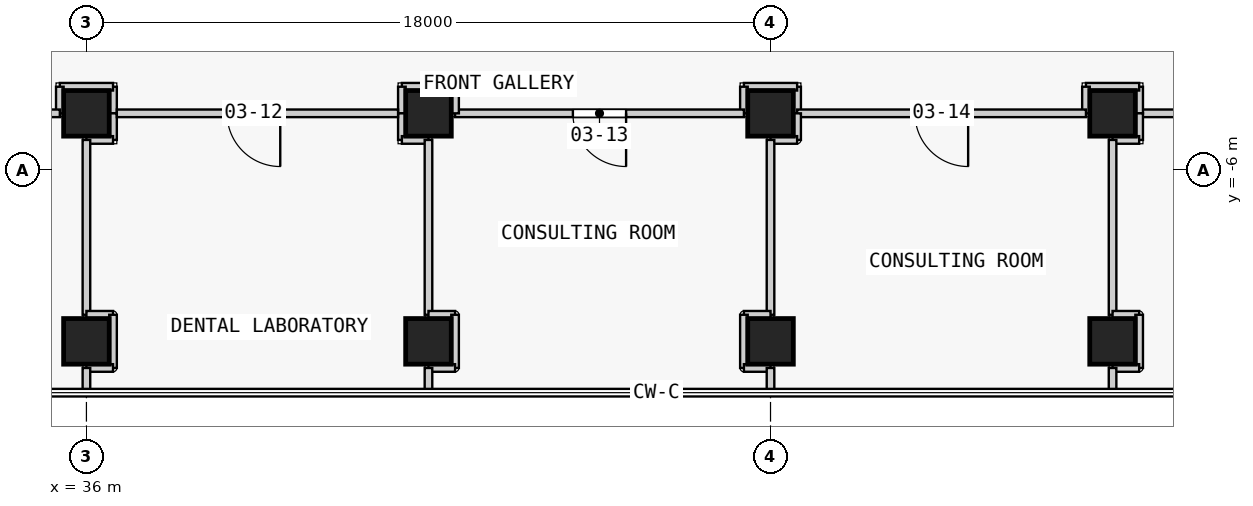
"""IFC4 building model, lengths in metres.
Left out: names, types, materials, properties, quantities, classifications, styles, units other than length and angle.
Written with IfcOpenShell. Run it as: python <this file> out.ifc"""

import sys

from ifc_helpers import new_model, si_unit, direction, frame, frame_2d, origin, origin_2d, place, context, subcontext, project, spatial, rectangle, extrude, element, fill, save


model = new_model("IFC4")
c1 = context("Model", 3, precision=1e-05, world=origin(), true_north=direction((0.0, 1.0)))
c2 = subcontext(c1, "Body", "Model", "MODEL_VIEW")
j1 = project(units=[si_unit("LENGTHUNIT", "METRE"), si_unit("PLANEANGLEUNIT", "RADIAN")], contexts=[c1])
p1 = place(None, origin())
s1 = spatial("IfcSite", under=j1, at=p1, CompositionType="ELEMENT")
p2 = place(p1, origin())
s2 = spatial("IfcBuilding", under=s1, at=p2, CompositionType="ELEMENT")
p3 = place(p2, frame((0.0, 0.0, 17.3)))
s3 = spatial("IfcBuildingStorey", under=s2, at=p3, CompositionType="ELEMENT", Elevation=17.3)
for number, where, z_axis, x_axis in (
    (1, (36.0, -10.5, 0.0), (0.0, 0.0, 1.0), (1.0, 0.0, 0.0)),
    (2, (36.0, -4.5, 0.0), (0.0, 0.0, 1.0), (1.0, 0.0, 0.0)),
    (3, (45.0, -10.5, 0.0), (0.0, 0.0, 1.0), (1.0, 0.0, 0.0)),
    (4, (45.0, -4.5, 0.0), (0.0, 0.0, 1.0), (1.0, 0.0, 0.0)),
    (5, (54.0, -10.5, 0.0), (0.0, 0.0, 1.0), (1.0, 0.0, 0.0)),
    (6, (54.0, -4.5, 0.0), (0.0, 0.0, 1.0), (1.0, 0.0, 0.0)),
    (7, (63.0, -10.5, 0.0), (0.0, 0.0, 1.0), (1.0, 0.0, 0.0)),
    (8, (63.0, -4.5, 0.0), (0.0, 0.0, 1.0), (1.0, 0.0, 0.0)),
):
    element("IfcColumn", number, at=place(p3, frame(where, z_axis=z_axis, x_axis=x_axis)), inside=s3, PredefinedType="COLUMN", context=c2, shape_type="SweptSolid", body=[
        extrude(rectangle(XDim=1.2, YDim=1.2, at=origin_2d()), origin(), (0.0, 0.0, 1.0), 4.5),
    ])
p4 = place(p3, frame((54.7, -4.5, 0.0), z_axis=(0.0, 0.0, 1.0), x_axis=(0.0, 1.0, 0.0)))
e9 = element("IfcWall", 9, at=p4, inside=s3, PredefinedType="PARTITIONING", context=c2, shape_type="SweptSolid", body=[
    extrude(rectangle(XDim=0.7, YDim=0.2, at=frame_2d((0.35, 0.0))), origin(), (0.0, 0.0, 1.0), 4.15),
])
p5 = place(p3, frame((54.7, -3.8, 0.0), z_axis=(0.0, 0.0, 1.0), x_axis=(-1.0, 0.0, 0.0)))
e10 = element("IfcWall", 10, at=p5, inside=s3, PredefinedType="PARTITIONING", context=c2, shape_type="SweptSolid", body=[
    extrude(rectangle(XDim=1.4, YDim=0.2, at=frame_2d((0.7, 0.0))), origin(), (0.0, 0.0, 1.0), 4.15),
])
p6 = place(p3, frame((53.3, -3.8, 0.0), z_axis=(0.0, 0.0, 1.0), x_axis=(0.0, -1.0, 0.0)))
e11 = element("IfcWall", 11, at=p6, inside=s3, PredefinedType="PARTITIONING", context=c2, shape_type="SweptSolid", body=[
    extrude(rectangle(XDim=0.7, YDim=0.2, at=frame_2d((0.35, 0.0))), origin(), (0.0, 0.0, 1.0), 4.15),
])
p7 = place(p3, frame((53.3, -4.5, 0.0), z_axis=(0.0, 0.0, 1.0), x_axis=(-1.0, 0.0, 0.0)))
e12 = element("IfcWall", 12, at=p7, inside=s3, PredefinedType="PARTITIONING", context=c2, shape_type="SweptSolid", body=[
    extrude(rectangle(XDim=7.6, YDim=0.2, at=frame_2d((3.8, 0.0))), origin(), (0.0, 0.0, 1.0), 4.15),
])
p8 = place(p7, frame((3.1, 0.0, 0.0)))
e13 = element("IfcOpeningElement", 13, at=p8, cuts=e12, PredefinedType="OPENING", context=c2, shape_type="SweptSolid", body=[
    extrude(rectangle(XDim=1.4, YDim=2.1, at=frame_2d((0.7, 1.05))), frame((0.0, 0.11, 0.0), z_axis=(0.0, -1.0, 0.0), x_axis=(1.0, 0.0, 0.0)), (0.0, 0.0, 1.0), 0.22),
])
p9 = place(p3, frame((45.7, -4.5, 0.0), z_axis=(0.0, 0.0, 1.0), x_axis=(0.0, 1.0, 0.0)))
e14 = element("IfcWall", 14, at=p9, inside=s3, PredefinedType="PARTITIONING", context=c2, shape_type="SweptSolid", body=[
    extrude(rectangle(XDim=0.7, YDim=0.2, at=frame_2d((0.35, 0.0))), origin(), (0.0, 0.0, 1.0), 4.15),
])
p10 = place(p3, frame((45.7, -3.8, 0.0), z_axis=(0.0, 0.0, 1.0), x_axis=(-1.0, 0.0, 0.0)))
e15 = element("IfcWall", 15, at=p10, inside=s3, PredefinedType="PARTITIONING", context=c2, shape_type="SweptSolid", body=[
    extrude(rectangle(XDim=1.4, YDim=0.2, at=frame_2d((0.7, 0.0))), origin(), (0.0, 0.0, 1.0), 4.15),
])
for number, where, z_axis, x_axis in (
    (16, (44.3, -3.8, 0.0), (0.0, 0.0, 1.0), (0.0, -1.0, 0.0)),
    (17, (36.7, -4.5, 0.0), (0.0, 0.0, 1.0), (0.0, 1.0, 0.0)),
):
    element("IfcWall", number, at=place(p3, frame(where, z_axis=z_axis, x_axis=x_axis)), inside=s3, PredefinedType="PARTITIONING", context=c2, shape_type="SweptSolid", body=[
        extrude(rectangle(XDim=0.7, YDim=0.2, at=frame_2d((0.35, 0.0))), origin(), (0.0, 0.0, 1.0), 4.15),
    ])
p11 = place(p3, frame((36.7, -3.8, 0.0), z_axis=(0.0, 0.0, 1.0), x_axis=(-1.0, 0.0, 0.0)))
e18 = element("IfcWall", 18, at=p11, inside=s3, PredefinedType="PARTITIONING", context=c2, shape_type="SweptSolid", body=[
    extrude(rectangle(XDim=1.4, YDim=0.2, at=frame_2d((0.7, 0.0))), origin(), (0.0, 0.0, 1.0), 4.15),
])
p12 = place(p3, frame((35.3, -3.8, 0.0), z_axis=(0.0, 0.0, 1.0), x_axis=(0.0, -1.0, 0.0)))
e19 = element("IfcWall", 19, at=p12, inside=s3, PredefinedType="PARTITIONING", context=c2, shape_type="SweptSolid", body=[
    extrude(rectangle(XDim=0.7, YDim=0.2, at=frame_2d((0.35, 0.0))), origin(), (0.0, 0.0, 1.0), 4.15),
])
p13 = place(p3, frame((35.3, -4.5, 0.0), z_axis=(0.0, 0.0, 1.0), x_axis=(-1.0, 0.0, 0.0)))
e20 = element("IfcWall", 20, at=p13, inside=s3, PredefinedType="PARTITIONING", context=c2, shape_type="SweptSolid", body=[
    extrude(rectangle(XDim=7.6, YDim=0.2, at=frame_2d((3.8, 0.0))), origin(), (0.0, 0.0, 1.0), 4.15),
])
p14 = place(p13, frame((3.1, 0.0, 0.0)))
e21 = element("IfcOpeningElement", 21, at=p14, cuts=e20, PredefinedType="OPENING", context=c2, shape_type="SweptSolid", body=[
    extrude(rectangle(XDim=1.4, YDim=2.1, at=frame_2d((0.7, 1.05))), frame((0.0, 0.11, 0.0), z_axis=(0.0, -1.0, 0.0), x_axis=(1.0, 0.0, 0.0)), (0.0, 0.0, 1.0), 0.22),
])
p15 = place(p3, frame((74.0, -4.5, 0.0), z_axis=(0.0, 0.0, 1.0), x_axis=(-1.0, 0.0, 0.0)))
e22 = element("IfcWall", 22, at=p15, inside=s3, PredefinedType="PARTITIONING", context=c2, shape_type="SweptSolid", body=[
    extrude(rectangle(XDim=10.3, YDim=0.2, at=frame_2d((5.15, 0.0))), origin(), (0.0, 0.0, 1.0), 4.15),
])
p16 = place(p15, frame((4.35, 0.0, 0.0)))
e23 = element("IfcOpeningElement", 23, at=p16, cuts=e22, PredefinedType="OPENING", context=c2, shape_type="SweptSolid", body=[
    extrude(rectangle(XDim=1.4, YDim=2.1, at=frame_2d((0.7, 1.05))), frame((0.0, 0.11, 0.0), z_axis=(0.0, -1.0, 0.0), x_axis=(1.0, 0.0, 0.0)), (0.0, 0.0, 1.0), 0.22),
])
p17 = place(p3, frame((63.7, -4.5, 0.0), z_axis=(0.0, 0.0, 1.0), x_axis=(0.0, 1.0, 0.0)))
e24 = element("IfcWall", 24, at=p17, inside=s3, PredefinedType="PARTITIONING", context=c2, shape_type="SweptSolid", body=[
    extrude(rectangle(XDim=0.7, YDim=0.2, at=frame_2d((0.35, 0.0))), origin(), (0.0, 0.0, 1.0), 4.15),
])
p18 = place(p3, frame((63.7, -3.8, 0.0), z_axis=(0.0, 0.0, 1.0), x_axis=(-1.0, 0.0, 0.0)))
e25 = element("IfcWall", 25, at=p18, inside=s3, PredefinedType="PARTITIONING", context=c2, shape_type="SweptSolid", body=[
    extrude(rectangle(XDim=1.4, YDim=0.2, at=frame_2d((0.7, 0.0))), origin(), (0.0, 0.0, 1.0), 4.15),
])
p19 = place(p3, frame((62.3, -3.8, 0.0), z_axis=(0.0, 0.0, 1.0), x_axis=(0.0, -1.0, 0.0)))
e26 = element("IfcWall", 26, at=p19, inside=s3, PredefinedType="PARTITIONING", context=c2, shape_type="SweptSolid", body=[
    extrude(rectangle(XDim=0.7, YDim=0.2, at=frame_2d((0.35, 0.0))), origin(), (0.0, 0.0, 1.0), 4.15),
])
p20 = place(p3, frame((62.3, -4.5, 0.0), z_axis=(0.0, 0.0, 1.0), x_axis=(-1.0, 0.0, 0.0)))
e27 = element("IfcWall", 27, at=p20, inside=s3, PredefinedType="PARTITIONING", context=c2, shape_type="SweptSolid", body=[
    extrude(rectangle(XDim=7.6, YDim=0.2, at=frame_2d((3.8, 0.0))), origin(), (0.0, 0.0, 1.0), 4.15),
])
p21 = place(p20, frame((3.1, 0.0, 0.0)))
e28 = element("IfcOpeningElement", 28, at=p21, cuts=e27, PredefinedType="OPENING", context=c2, shape_type="SweptSolid", body=[
    extrude(rectangle(XDim=1.4, YDim=2.1, at=frame_2d((0.7, 1.05))), frame((0.0, 0.11, 0.0), z_axis=(0.0, -1.0, 0.0), x_axis=(1.0, 0.0, 0.0)), (0.0, 0.0, 1.0), 0.22),
])
for number, where, z_axis, x_axis in (
    (29, (44.3, -4.5, 0.0), (0.0, 0.0, 1.0), (0.0, -1.0, 0.0)),
    (30, (44.3, -5.2, 0.0), (0.0, 0.0, 1.0), (1.0, 0.0, 0.0)),
):
    element("IfcWall", number, at=place(p3, frame(where, z_axis=z_axis, x_axis=x_axis)), inside=s3, PredefinedType="PARTITIONING", context=c2, shape_type="SweptSolid", body=[
        extrude(rectangle(XDim=0.7, YDim=0.2, at=frame_2d((0.35, 0.0))), origin(), (0.0, 0.0, 1.0), 4.15),
    ])
p22 = place(p3, frame((45.0, -5.2, 0.0), z_axis=(0.0, 0.0, 1.0), x_axis=(0.0, -1.0, 0.0)))
e31 = element("IfcWall", 31, at=p22, inside=s3, PredefinedType="PARTITIONING", context=c2, shape_type="SweptSolid", body=[
    extrude(rectangle(XDim=4.6, YDim=0.2, at=frame_2d((2.3, 0.0))), origin(), (0.0, 0.0, 1.0), 4.15),
])
p23 = place(p3, frame((45.0, -9.8, 0.0), z_axis=(0.0, 0.0, 1.0), x_axis=(1.0, 0.0, 0.0)))
e32 = element("IfcWall", 32, at=p23, inside=s3, PredefinedType="PARTITIONING", context=c2, shape_type="SweptSolid", body=[
    extrude(rectangle(XDim=0.7, YDim=0.2, at=frame_2d((0.35, 0.0))), origin(), (0.0, 0.0, 1.0), 4.15),
])
p24 = place(p3, frame((45.7, -9.8, 0.0), z_axis=(0.0, 0.0, 1.0), x_axis=(0.0, -1.0, 0.0)))
e33 = element("IfcWall", 33, at=p24, inside=s3, PredefinedType="PARTITIONING", context=c2, shape_type="SweptSolid", body=[
    extrude(rectangle(XDim=1.4, YDim=0.2, at=frame_2d((0.7, 0.0))), origin(), (0.0, 0.0, 1.0), 4.15),
])
p25 = place(p3, frame((45.7, -11.2, 0.0), z_axis=(0.0, 0.0, 1.0), x_axis=(-1.0, 0.0, 0.0)))
e34 = element("IfcWall", 34, at=p25, inside=s3, PredefinedType="PARTITIONING", context=c2, shape_type="SweptSolid", body=[
    extrude(rectangle(XDim=0.7, YDim=0.2, at=frame_2d((0.35, 0.0))), origin(), (0.0, 0.0, 1.0), 4.15),
])
p26 = place(p3, frame((45.0, -11.2, 0.0), z_axis=(0.0, 0.0, 1.0), x_axis=(0.0, -1.0, 0.0)))
e35 = element("IfcWall", 35, at=p26, inside=s3, PredefinedType="PARTITIONING", context=c2, shape_type="SweptSolid", body=[
    extrude(rectangle(XDim=0.65, YDim=0.2, at=frame_2d((0.325, 0.0))), origin(), (0.0, 0.0, 1.0), 4.15),
])
for number, where, z_axis, x_axis in (
    (36, (54.7, -4.5, 0.0), (0.0, 0.0, 1.0), (0.0, -1.0, 0.0)),
    (37, (54.7, -5.2, 0.0), (0.0, 0.0, 1.0), (-1.0, 0.0, 0.0)),
):
    element("IfcWall", number, at=place(p3, frame(where, z_axis=z_axis, x_axis=x_axis)), inside=s3, PredefinedType="PARTITIONING", context=c2, shape_type="SweptSolid", body=[
        extrude(rectangle(XDim=0.7, YDim=0.2, at=frame_2d((0.35, 0.0))), origin(), (0.0, 0.0, 1.0), 4.15),
    ])
p27 = place(p3, frame((54.0, -5.2, 0.0), z_axis=(0.0, 0.0, 1.0), x_axis=(0.0, -1.0, 0.0)))
e38 = element("IfcWall", 38, at=p27, inside=s3, PredefinedType="PARTITIONING", context=c2, shape_type="SweptSolid", body=[
    extrude(rectangle(XDim=4.6, YDim=0.2, at=frame_2d((2.3, 0.0))), origin(), (0.0, 0.0, 1.0), 4.15),
])
p28 = place(p3, frame((54.0, -9.8, 0.0), z_axis=(0.0, 0.0, 1.0), x_axis=(-1.0, 0.0, 0.0)))
e39 = element("IfcWall", 39, at=p28, inside=s3, PredefinedType="PARTITIONING", context=c2, shape_type="SweptSolid", body=[
    extrude(rectangle(XDim=0.7, YDim=0.2, at=frame_2d((0.35, 0.0))), origin(), (0.0, 0.0, 1.0), 4.15),
])
p29 = place(p3, frame((53.3, -9.8, 0.0), z_axis=(0.0, 0.0, 1.0), x_axis=(0.0, -1.0, 0.0)))
e40 = element("IfcWall", 40, at=p29, inside=s3, PredefinedType="PARTITIONING", context=c2, shape_type="SweptSolid", body=[
    extrude(rectangle(XDim=1.4, YDim=0.2, at=frame_2d((0.7, 0.0))), origin(), (0.0, 0.0, 1.0), 4.15),
])
p30 = place(p3, frame((53.3, -11.2, 0.0), z_axis=(0.0, 0.0, 1.0), x_axis=(1.0, 0.0, 0.0)))
e41 = element("IfcWall", 41, at=p30, inside=s3, PredefinedType="PARTITIONING", context=c2, shape_type="SweptSolid", body=[
    extrude(rectangle(XDim=0.7, YDim=0.2, at=frame_2d((0.35, 0.0))), origin(), (0.0, 0.0, 1.0), 4.15),
])
p31 = place(p3, frame((54.0, -11.2, 0.0), z_axis=(0.0, 0.0, 1.0), x_axis=(0.0, -1.0, 0.0)))
e42 = element("IfcWall", 42, at=p31, inside=s3, PredefinedType="PARTITIONING", context=c2, shape_type="SweptSolid", body=[
    extrude(rectangle(XDim=0.65, YDim=0.2, at=frame_2d((0.325, 0.0))), origin(), (0.0, 0.0, 1.0), 4.15),
])
for number, where, z_axis, x_axis in (
    (43, (63.7, -4.5, 0.0), (0.0, 0.0, 1.0), (0.0, -1.0, 0.0)),
    (44, (63.7, -5.2, 0.0), (0.0, 0.0, 1.0), (-1.0, 0.0, 0.0)),
):
    element("IfcWall", number, at=place(p3, frame(where, z_axis=z_axis, x_axis=x_axis)), inside=s3, PredefinedType="PARTITIONING", context=c2, shape_type="SweptSolid", body=[
        extrude(rectangle(XDim=0.7, YDim=0.2, at=frame_2d((0.35, 0.0))), origin(), (0.0, 0.0, 1.0), 4.15),
    ])
p32 = place(p3, frame((63.0, -5.2, 0.0), z_axis=(0.0, 0.0, 1.0), x_axis=(0.0, -1.0, 0.0)))
e45 = element("IfcWall", 45, at=p32, inside=s3, PredefinedType="PARTITIONING", context=c2, shape_type="SweptSolid", body=[
    extrude(rectangle(XDim=4.6, YDim=0.2, at=frame_2d((2.3, 0.0))), origin(), (0.0, 0.0, 1.0), 4.15),
])
p33 = place(p3, frame((63.0, -9.8, 0.0), z_axis=(0.0, 0.0, 1.0), x_axis=(1.0, 0.0, 0.0)))
e46 = element("IfcWall", 46, at=p33, inside=s3, PredefinedType="PARTITIONING", context=c2, shape_type="SweptSolid", body=[
    extrude(rectangle(XDim=0.7, YDim=0.2, at=frame_2d((0.35, 0.0))), origin(), (0.0, 0.0, 1.0), 4.15),
])
p34 = place(p3, frame((63.7, -9.8, 0.0), z_axis=(0.0, 0.0, 1.0), x_axis=(0.0, -1.0, 0.0)))
e47 = element("IfcWall", 47, at=p34, inside=s3, PredefinedType="PARTITIONING", context=c2, shape_type="SweptSolid", body=[
    extrude(rectangle(XDim=1.4, YDim=0.2, at=frame_2d((0.7, 0.0))), origin(), (0.0, 0.0, 1.0), 4.15),
])
p35 = place(p3, frame((63.7, -11.2, 0.0), z_axis=(0.0, 0.0, 1.0), x_axis=(-1.0, 0.0, 0.0)))
e48 = element("IfcWall", 48, at=p35, inside=s3, PredefinedType="PARTITIONING", context=c2, shape_type="SweptSolid", body=[
    extrude(rectangle(XDim=0.7, YDim=0.2, at=frame_2d((0.35, 0.0))), origin(), (0.0, 0.0, 1.0), 4.15),
])
p36 = place(p3, frame((63.0, -11.2, 0.0), z_axis=(0.0, 0.0, 1.0), x_axis=(0.0, -1.0, 0.0)))
e49 = element("IfcWall", 49, at=p36, inside=s3, PredefinedType="PARTITIONING", context=c2, shape_type="SweptSolid", body=[
    extrude(rectangle(XDim=0.65, YDim=0.2, at=frame_2d((0.325, 0.0))), origin(), (0.0, 0.0, 1.0), 4.15),
])
for number, where, z_axis, x_axis in (
    (50, (36.7, -4.5, 0.0), (0.0, 0.0, 1.0), (0.0, -1.0, 0.0)),
    (51, (36.7, -5.2, 0.0), (0.0, 0.0, 1.0), (-1.0, 0.0, 0.0)),
):
    element("IfcWall", number, at=place(p3, frame(where, z_axis=z_axis, x_axis=x_axis)), inside=s3, PredefinedType="PARTITIONING", context=c2, shape_type="SweptSolid", body=[
        extrude(rectangle(XDim=0.7, YDim=0.2, at=frame_2d((0.35, 0.0))), origin(), (0.0, 0.0, 1.0), 4.15),
    ])
p37 = place(p3, frame((36.0, -5.2, 0.0), z_axis=(0.0, 0.0, 1.0), x_axis=(0.0, -1.0, 0.0)))
e52 = element("IfcWall", 52, at=p37, inside=s3, PredefinedType="PARTITIONING", context=c2, shape_type="SweptSolid", body=[
    extrude(rectangle(XDim=4.6, YDim=0.2, at=frame_2d((2.3, 0.0))), origin(), (0.0, 0.0, 1.0), 4.15),
])
p38 = place(p3, frame((36.0, -9.8, 0.0), z_axis=(0.0, 0.0, 1.0), x_axis=(1.0, 0.0, 0.0)))
e53 = element("IfcWall", 53, at=p38, inside=s3, PredefinedType="PARTITIONING", context=c2, shape_type="SweptSolid", body=[
    extrude(rectangle(XDim=0.7, YDim=0.2, at=frame_2d((0.35, 0.0))), origin(), (0.0, 0.0, 1.0), 4.15),
])
p39 = place(p3, frame((36.7, -9.8, 0.0), z_axis=(0.0, 0.0, 1.0), x_axis=(0.0, -1.0, 0.0)))
e54 = element("IfcWall", 54, at=p39, inside=s3, PredefinedType="PARTITIONING", context=c2, shape_type="SweptSolid", body=[
    extrude(rectangle(XDim=1.4, YDim=0.2, at=frame_2d((0.7, 0.0))), origin(), (0.0, 0.0, 1.0), 4.15),
])
p40 = place(p3, frame((36.7, -11.2, 0.0), z_axis=(0.0, 0.0, 1.0), x_axis=(-1.0, 0.0, 0.0)))
e55 = element("IfcWall", 55, at=p40, inside=s3, PredefinedType="PARTITIONING", context=c2, shape_type="SweptSolid", body=[
    extrude(rectangle(XDim=0.7, YDim=0.2, at=frame_2d((0.35, 0.0))), origin(), (0.0, 0.0, 1.0), 4.15),
])
p41 = place(p3, frame((36.0, -11.2, 0.0), z_axis=(0.0, 0.0, 1.0), x_axis=(0.0, -1.0, 0.0)))
e56 = element("IfcWall", 56, at=p41, inside=s3, PredefinedType="PARTITIONING", context=c2, shape_type="SweptSolid", body=[
    extrude(rectangle(XDim=0.65, YDim=0.2, at=frame_2d((0.325, 0.0))), origin(), (0.0, 0.0, 1.0), 4.15),
])
p42 = place(p3, frame((44.2, -4.5, 0.0), z_axis=(0.0, 0.0, 1.0), x_axis=(-1.0, 0.0, 0.0)))
e57 = element("IfcWall", 57, at=p42, inside=s3, PredefinedType="PARTITIONING", context=c2, shape_type="SweptSolid", body=[
    extrude(rectangle(XDim=7.4, YDim=0.2, at=frame_2d((3.7, 0.0))), origin(), (0.0, 0.0, 1.0), 4.15),
])
p43 = place(p42, frame((3.1, 0.0, 0.0)))
e58 = element("IfcOpeningElement", 58, at=p43, cuts=e57, PredefinedType="OPENING", context=c2, shape_type="SweptSolid", body=[
    extrude(rectangle(XDim=1.4, YDim=2.1, at=frame_2d((0.7, 1.05))), frame((0.0, 0.11, 0.0), z_axis=(0.0, -1.0, 0.0), x_axis=(1.0, 0.0, 0.0)), (0.0, 0.0, 1.0), 0.22),
])
p44 = place(p43, origin())
e59 = element("IfcDoor", 59, at=p44, inside=s3, OperationType="SINGLE_SWING_LEFT", PredefinedType="DOOR", context=c2, shape_type="SweptSolid", body=[
    extrude(rectangle(XDim=1.4, YDim=2.1, at=frame_2d((0.7, 1.05))), frame((0.0, 0.025, 0.0), z_axis=(0.0, -1.0, 0.0), x_axis=(1.0, 0.0, 0.0)), (0.0, 0.0, 1.0), 0.05),
])
fill(e58, e59)
p45 = place(p8, origin())
e60 = element("IfcDoor", 60, at=p45, inside=s3, OperationType="SINGLE_SWING_LEFT", PredefinedType="DOOR", context=c2, shape_type="SweptSolid", body=[
    extrude(rectangle(XDim=1.4, YDim=2.1, at=frame_2d((0.7, 1.05))), frame((0.0, 0.025, 0.0), z_axis=(0.0, -1.0, 0.0), x_axis=(1.0, 0.0, 0.0)), (0.0, 0.0, 1.0), 0.05),
])
fill(e13, e60)
p46 = place(p21, origin())
e61 = element("IfcDoor", 61, at=p46, inside=s3, OperationType="SINGLE_SWING_LEFT", PredefinedType="DOOR", context=c2, shape_type="SweptSolid", body=[
    extrude(rectangle(XDim=1.4, YDim=2.1, at=frame_2d((0.7, 1.05))), frame((0.0, 0.025, 0.0), z_axis=(0.0, -1.0, 0.0), x_axis=(1.0, 0.0, 0.0)), (0.0, 0.0, 1.0), 0.05),
])
fill(e28, e61)
save(model, sys.argv[1])
